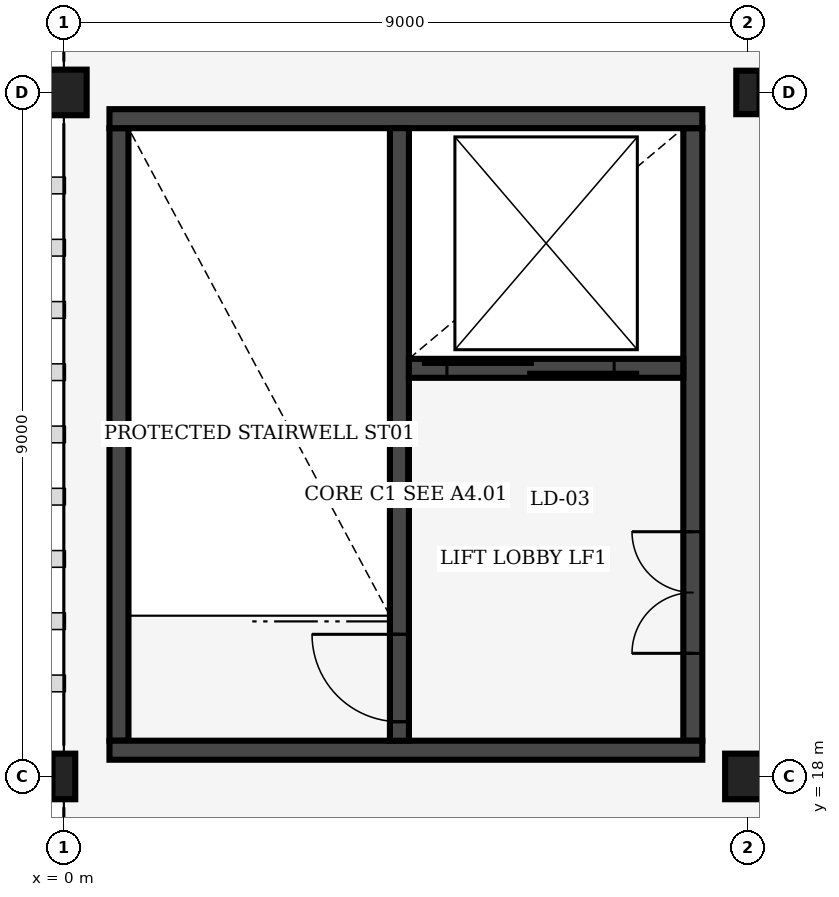
"""IFC4 building model, lengths in metres.
Left out: names, types, materials, properties, quantities, classifications, styles, units other than length and angle.
Written with IfcOpenShell. Run it as: python <this file> out.ifc"""

import sys

from ifc_helpers import new_model, si_unit, direction, frame, frame_2d, origin, origin_2d, place, context, subcontext, project, spatial, rectangle, i_section, extrude, element, fill, save


model = new_model("IFC4")
c1 = context("Model", 3, precision=1e-05, world=origin(), true_north=direction((0.0, 1.0)))
c2 = subcontext(c1, "Body", "Model", "MODEL_VIEW")
j1 = project(units=[si_unit("LENGTHUNIT", "METRE"), si_unit("PLANEANGLEUNIT", "RADIAN")], contexts=[c1])
p1 = place(None, origin())
s1 = spatial("IfcSite", under=j1, at=p1, CompositionType="ELEMENT")
p2 = place(p1, origin())
s2 = spatial("IfcBuilding", under=s1, at=p2, CompositionType="ELEMENT")
p3 = place(p2, frame((0.0, 0.0, 12.0)))
s3 = spatial("IfcBuildingStorey", under=s2, at=p3, CompositionType="ELEMENT", Elevation=12.0)
p4 = place(p3, frame((0.0, 18.0, 0.0), z_axis=(0.0, 0.0, 1.0), x_axis=(1.0, 0.0, 0.0)))
e1 = element("IfcColumn", 1, at=p4, inside=s3, PredefinedType="COLUMN", context=c2, shape_type="SweptSolid", body=[
    extrude(i_section(OverallWidth=0.3, OverallDepth=0.6, WebThickness=0.015, FlangeThickness=0.03, FilletRadius=0.027, at=origin_2d()), origin(), (0.0, 0.0, 1.0), 6.0),
])
for number, where, z_axis, x_axis in (
    (2, (0.0, 27.0, 0.0), (0.0, 0.0, 1.0), (1.0, 0.0, 0.0)),
    (3, (9.0, 18.0, 0.0), (0.0, 0.0, 1.0), (1.0, 0.0, 0.0)),
):
    element("IfcColumn", number, at=place(p3, frame(where, z_axis=z_axis, x_axis=x_axis)), inside=s3, PredefinedType="COLUMN", context=c2, shape_type="SweptSolid", body=[
        extrude(rectangle(XDim=0.6, YDim=0.6, at=origin_2d()), origin(), (0.0, 0.0, 1.0), 6.0),
    ])
p5 = place(p3, frame((9.0, 27.0, 0.0), z_axis=(0.0, 0.0, 1.0), x_axis=(1.0, 0.0, 0.0)))
e4 = element("IfcColumn", 4, at=p5, inside=s3, PredefinedType="COLUMN", context=c2, shape_type="SweptSolid", body=[
    extrude(i_section(OverallWidth=0.306, OverallDepth=0.572, WebThickness=0.021, FlangeThickness=0.04, FilletRadius=0.027, at=origin_2d()), origin(), (0.0, 0.0, 1.0), 6.0),
])
p6 = place(p3, frame((0.725, 18.47, 0.0), z_axis=(0.0, 0.0, 1.0), x_axis=(0.0, 1.0, 0.0)))
e5 = element("IfcWall", 5, at=p6, inside=s3, PredefinedType="SHEAR", context=c2, shape_type="SweptSolid", body=[
    extrude(rectangle(XDim=8.06, YDim=0.25, at=frame_2d((4.03, 0.0))), origin(), (0.0, 0.0, 1.0), 5.64),
])
p7 = place(p3, frame((8.275, 18.47, 0.0), z_axis=(0.0, 0.0, 1.0), x_axis=(0.0, 1.0, 0.0)))
e6 = element("IfcWall", 6, at=p7, inside=s3, PredefinedType="SHEAR", context=c2, shape_type="SweptSolid", body=[
    extrude(rectangle(XDim=8.06, YDim=0.25, at=frame_2d((4.03, 0.0))), origin(), (0.0, 0.0, 1.0), 5.64),
])
p8 = place(p7, frame((1.15, 0.0, 0.0)))
e7 = element("IfcOpeningElement", 7, at=p8, cuts=e6, PredefinedType="OPENING", context=c2, shape_type="SweptSolid", body=[
    extrude(rectangle(XDim=1.6, YDim=2.2, at=frame_2d((0.8, 1.1))), frame((0.0, 0.135, 0.0), z_axis=(0.0, -1.0, 0.0), x_axis=(1.0, 0.0, 0.0)), (0.0, 0.0, 1.0), 0.27),
])
for number, where, z_axis, x_axis in (
    (8, (0.6, 18.345, 0.0), (0.0, 0.0, 1.0), (1.0, 0.0, 0.0)),
    (9, (0.6, 26.655, 0.0), (0.0, 0.0, 1.0), (1.0, 0.0, 0.0)),
):
    element("IfcWall", number, at=place(p3, frame(where, z_axis=z_axis, x_axis=x_axis)), inside=s3, PredefinedType="SHEAR", context=c2, shape_type="SweptSolid", body=[
        extrude(rectangle(XDim=7.8, YDim=0.25, at=frame_2d((3.9, 0.0))), origin(), (0.0, 0.0, 1.0), 5.64),
    ])
p9 = place(p3, frame((4.415, 18.47, 0.0), z_axis=(0.0, 0.0, 1.0), x_axis=(0.0, 1.0, 0.0)))
e10 = element("IfcWall", 10, at=p9, inside=s3, PredefinedType="SHEAR", context=c2, shape_type="SweptSolid", body=[
    extrude(rectangle(XDim=8.06, YDim=0.25, at=frame_2d((4.03, 0.0))), origin(), (0.0, 0.0, 1.0), 5.64),
])
p10 = place(p9, frame((0.25, 0.0, 0.0)))
e11 = element("IfcOpeningElement", 11, at=p10, cuts=e10, PredefinedType="OPENING", context=c2, shape_type="SweptSolid", body=[
    extrude(rectangle(XDim=1.15, YDim=2.15, at=frame_2d((0.575, 1.075))), frame((0.0, 0.135, 0.0), z_axis=(0.0, -1.0, 0.0), x_axis=(1.0, 0.0, 0.0)), (0.0, 0.0, 1.0), 0.27),
])
p11 = place(p3, frame((4.54, 23.37, 0.0), z_axis=(0.0, 0.0, 1.0), x_axis=(1.0, 0.0, 0.0)))
e12 = element("IfcWall", 12, at=p11, inside=s3, PredefinedType="SHEAR", context=c2, shape_type="SweptSolid", body=[
    extrude(rectangle(XDim=3.61, YDim=0.25, at=frame_2d((1.805, 0.0))), origin(), (0.0, 0.0, 1.0), 5.64),
])
p12 = place(p11, frame((0.5, 0.0, 0.0)))
e13 = element("IfcOpeningElement", 13, at=p12, cuts=e12, PredefinedType="OPENING", context=c2, shape_type="SweptSolid", body=[
    extrude(rectangle(XDim=2.2, YDim=2.4, at=frame_2d((1.1, 1.2))), frame((0.0, 0.135, 0.0), z_axis=(0.0, -1.0, 0.0), x_axis=(1.0, 0.0, 0.0)), (0.0, 0.0, 1.0), 0.27),
])
p13 = place(p10, origin())
e14 = element("IfcDoor", 14, at=p13, inside=s3, OperationType="SINGLE_SWING_RIGHT", PredefinedType="DOOR", context=c2, shape_type="SweptSolid", body=[
    extrude(rectangle(XDim=1.15, YDim=2.15, at=frame_2d((0.575, 1.075))), frame((0.0, 0.025, 0.0), z_axis=(0.0, -1.0, 0.0), x_axis=(1.0, 0.0, 0.0)), (0.0, 0.0, 1.0), 0.05),
])
fill(e11, e14)
p14 = place(p12, origin())
e15 = element("IfcDoor", 15, at=p14, inside=s3, OperationType="DOUBLE_DOOR_SLIDING", PredefinedType="DOOR", context=c2, shape_type="SweptSolid", body=[
    extrude(rectangle(XDim=2.2, YDim=2.4, at=frame_2d((1.1, 1.2))), frame((0.0, 0.025, 0.0), z_axis=(0.0, -1.0, 0.0), x_axis=(1.0, 0.0, 0.0)), (0.0, 0.0, 1.0), 0.05),
])
fill(e13, e15)
p15 = place(p8, origin())
e16 = element("IfcDoor", 16, at=p15, inside=s3, OperationType="DOUBLE_DOOR_SINGLE_SWING", PredefinedType="DOOR", context=c2, shape_type="SweptSolid", body=[
    extrude(rectangle(XDim=1.6, YDim=2.2, at=frame_2d((0.8, 1.1))), frame((0.0, 0.025, 0.0), z_axis=(0.0, -1.0, 0.0), x_axis=(1.0, 0.0, 0.0)), (0.0, 0.0, 1.0), 0.05),
])
fill(e7, e16)
save(model, sys.argv[1])
